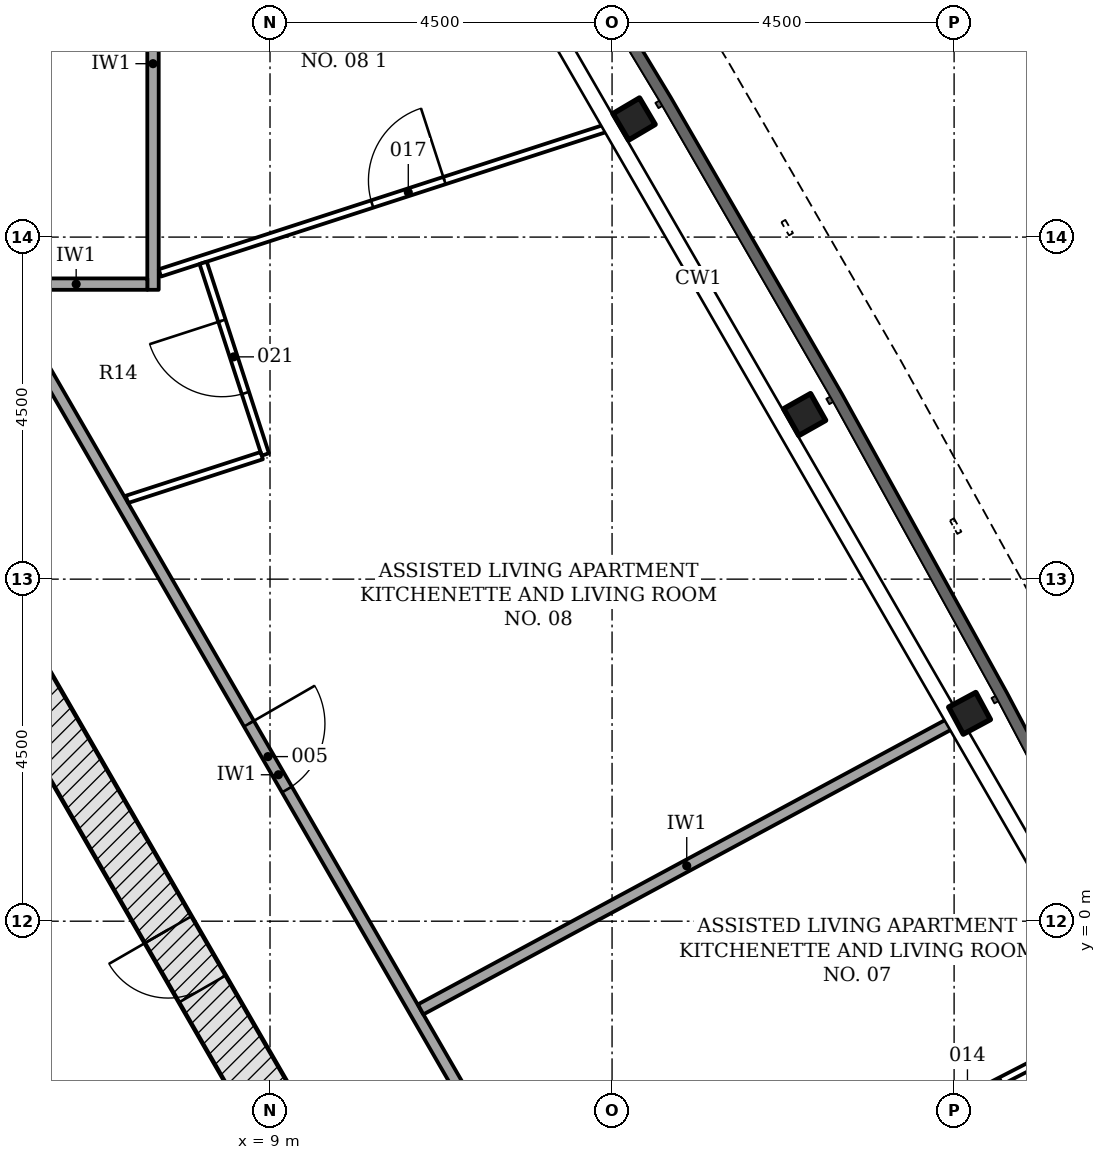
"""IFC4 building model, lengths in metres.
Left out: names, types, materials, properties, quantities, classifications, styles, units other than length and angle.
Written with IfcOpenShell. Run it as: python <this file> out.ifc"""

import sys

from ifc_helpers import new_model, si_unit, direction, frame, frame_2d, origin, origin_2d, place, context, subcontext, project, spatial, rectangle, i_section, extrude, element, fill, save


model = new_model("IFC4")
c1 = context("Model", 3, precision=1e-05, world=origin(), true_north=direction((0.0, 1.0)))
c2 = subcontext(c1, "Body", "Model", "MODEL_VIEW")
j1 = project(units=[si_unit("LENGTHUNIT", "METRE"), si_unit("PLANEANGLEUNIT", "RADIAN")], contexts=[c1])
p1 = place(None, origin())
s1 = spatial("IfcSite", under=j1, at=p1, CompositionType="ELEMENT")
p2 = place(p1, origin())
s2 = spatial("IfcBuilding", under=s1, at=p2, CompositionType="ELEMENT")
p3 = place(p2, frame((0.0, 0.0, 72.6)))
s3 = spatial("IfcBuildingStorey", under=s2, at=p3, CompositionType="ELEMENT", Elevation=72.6)
p4 = place(p3, frame((10.311, -4.703, -0.2), z_axis=(0.0, 0.0, 1.0), x_axis=(-0.500001446645, 0.866024568562, 0.0)))
e1 = element("IfcWall", 1, at=p4, inside=s3, PredefinedType="SHEAR", context=c2, shape_type="SweptSolid", body=[
    extrude(rectangle(XDim=18.458, YDim=0.7, at=frame_2d((9.229, 0.0))), origin(), (0.0, 0.0, 1.0), 3.6),
])
p5 = place(p4, frame((9.5, 0.0, 0.2)))
e2 = element("IfcOpeningElement", 2, at=p5, cuts=e1, PredefinedType="OPENING", context=c2, shape_type="SweptSolid", body=[
    extrude(rectangle(XDim=1.0, YDim=2.1, at=frame_2d((0.5, 1.05))), frame((0.0, 0.36, 0.0), z_axis=(0.0, -1.0, 0.0), x_axis=(1.0, 0.0, 0.0)), (0.0, 0.0, 1.0), 0.72),
])
p6 = place(p4, frame((4.402, 0.0, 0.2)))
e3 = element("IfcOpeningElement", 3, at=p6, cuts=e1, PredefinedType="OPENING", context=c2, shape_type="SweptSolid", body=[
    extrude(rectangle(XDim=0.9, YDim=2.1, at=frame_2d((0.45, 1.05))), frame((0.0, 0.36, 0.0), z_axis=(0.0, -1.0, 0.0), x_axis=(1.0, 0.0, 0.0)), (0.0, 0.0, 1.0), 0.72),
])
p7 = place(p4, frame((13.927, 0.0, 0.2)))
e4 = element("IfcOpeningElement", 4, at=p7, cuts=e1, PredefinedType="OPENING", context=c2, shape_type="SweptSolid", body=[
    extrude(rectangle(XDim=0.9, YDim=2.1, at=frame_2d((0.45, 1.05))), frame((0.0, 0.36, 0.0), z_axis=(0.0, -1.0, 0.0), x_axis=(1.0, 0.0, 0.0)), (0.0, 0.0, 1.0), 0.72),
])
for number, where, z_axis, x_axis in (
    (5, (18.203, 2.735, -0.2), (0.0, 0.0, 1.0), (-0.475, 0.88, 0.0)),
    (6, (16.034, 6.665, -0.2), (0.0, 0.0, 1.0), (-0.492, 0.871, 0.0)),
    (7, (13.789, 10.553, -0.2), (0.0, 0.0, 1.0), (-0.508, 0.861, 0.0)),
):
    element("IfcColumn", number, at=place(p3, frame(where, z_axis=z_axis, x_axis=x_axis)), inside=s3, PredefinedType="COLUMN", context=c2, shape_type="SweptSolid", body=[
        extrude(i_section(OverallWidth=0.404, OverallDepth=0.406, WebThickness=0.027, FlangeThickness=0.044, FilletRadius=0.015, at=origin_2d()), origin(), (0.0, 0.0, 1.0), 3.6),
    ])
p8 = place(p3, frame((5.346, 8.446, 0.0), z_axis=(0.0, 0.0, 1.0), x_axis=(0.500008781656, -0.866020333634, 0.0)))
e8 = element("IfcWall", 8, at=p8, inside=s3, PredefinedType="PARTITIONING", context=c2, shape_type="SweptSolid", body=[
    extrude(rectangle(XDim=15.057, YDim=0.15, at=frame_2d((7.528, 0.0))), origin(), (0.0, 0.0, 1.0), 2.778),
])
p9 = place(p8, frame((12.55, 0.0, 0.0)))
e9 = element("IfcOpeningElement", 9, at=p9, cuts=e8, PredefinedType="OPENING", context=c2, shape_type="SweptSolid", body=[
    extrude(rectangle(XDim=1.0, YDim=2.1, at=frame_2d((0.5, 1.05))), frame((0.0, 0.085, 0.0), z_axis=(0.0, -1.0, 0.0), x_axis=(1.0, 0.0, 0.0)), (0.0, 0.0, 1.0), 0.17),
])
p10 = place(p8, frame((6.753, 0.0, 0.0)))
e10 = element("IfcOpeningElement", 10, at=p10, cuts=e8, PredefinedType="OPENING", context=c2, shape_type="SweptSolid", body=[
    extrude(rectangle(XDim=1.0, YDim=2.1, at=frame_2d((0.5, 1.05))), frame((0.0, 0.085, 0.0), z_axis=(0.0, -1.0, 0.0), x_axis=(1.0, 0.0, 0.0)), (0.0, 0.0, 1.0), 0.17),
])
p11 = place(p3, frame((7.461, 8.306, 0.0), z_axis=(0.0, 0.0, 1.0), x_axis=(0.0, 1.0, 0.0)))
e11 = element("IfcWall", 11, at=p11, inside=s3, PredefinedType="PARTITIONING", context=c2, shape_type="SweptSolid", body=[
    extrude(rectangle(XDim=5.95, YDim=0.15, at=frame_2d((2.975, 0.0))), origin(), (0.0, 0.0, 1.0), 2.778),
])
p12 = place(p3, frame((5.514, 8.381, 0.0), z_axis=(0.0, 0.0, 1.0), x_axis=(1.0, 0.0, 0.0)))
e12 = element("IfcWall", 12, at=p12, inside=s3, PredefinedType="PARTITIONING", context=c2, shape_type="SweptSolid", body=[
    extrude(rectangle(XDim=1.872, YDim=0.15, at=frame_2d((0.936, 0.0))), origin(), (0.0, 0.0, 1.0), 3.4),
])
p13 = place(p3, frame((17.983, 2.616, 0.0), z_axis=(0.0, 0.0, 1.0), x_axis=(-0.880118053528, -0.474754896608, 0.0)))
e13 = element("IfcWall", 13, at=p13, inside=s3, PredefinedType="PARTITIONING", context=c2, shape_type="SweptSolid", body=[
    extrude(rectangle(XDim=7.955, YDim=0.15, at=frame_2d((3.978, 0.0))), origin(), (0.0, 0.0, 1.0), 2.778),
])
p14 = place(p3, frame((20.074, -1.351, 0.0), z_axis=(0.0, 0.0, 1.0), x_axis=(-0.88912315758, -0.457668013582, 0.0)))
e14 = element("IfcWall", 14, at=p14, inside=s3, PredefinedType="PARTITIONING", context=c2, shape_type="SweptSolid", body=[
    extrude(rectangle(XDim=8.429, YDim=0.1, at=frame_2d((4.214, 0.0))), origin(), (0.0, 0.0, 1.0), 2.778),
])
p15 = place(p14, frame((5.868, 0.0, 0.0)))
e15 = element("IfcOpeningElement", 15, at=p15, cuts=e14, PredefinedType="OPENING", context=c2, shape_type="SweptSolid", body=[
    extrude(rectangle(XDim=1.0, YDim=2.1, at=frame_2d((0.5, 1.05))), frame((0.0, 0.06, 0.0), z_axis=(0.0, -1.0, 0.0), x_axis=(1.0, 0.0, 0.0)), (0.0, 0.0, 1.0), 0.12),
])
p16 = place(p14, frame((1.635, 0.0, 0.0)))
e16 = element("IfcOpeningElement", 16, at=p16, cuts=e14, PredefinedType="OPENING", context=c2, shape_type="SweptSolid", body=[
    extrude(rectangle(XDim=1.0, YDim=2.1, at=frame_2d((0.5, 1.05))), frame((0.0, 0.06, 0.0), z_axis=(0.0, -1.0, 0.0), x_axis=(1.0, 0.0, 0.0)), (0.0, 0.0, 1.0), 0.12),
])
p17 = place(p3, frame((7.551, 8.529, 0.0), z_axis=(0.0, 0.0, 1.0), x_axis=(0.951171490306, 0.308662916511, 0.0)))
e17 = element("IfcWall", 17, at=p17, inside=s3, PredefinedType="PARTITIONING", context=c2, shape_type="SweptSolid", body=[
    extrude(rectangle(XDim=6.302, YDim=0.1, at=frame_2d((3.151, 0.0))), origin(), (0.0, 0.0, 1.0), 2.778),
])
p18 = place(p17, frame((2.936, 0.0, 0.0)))
e18 = element("IfcOpeningElement", 18, at=p18, cuts=e17, PredefinedType="OPENING", context=c2, shape_type="SweptSolid", body=[
    extrude(rectangle(XDim=1.0, YDim=2.1, at=frame_2d((0.5, 1.05))), frame((0.0, 0.06, 0.0), z_axis=(0.0, -1.0, 0.0), x_axis=(1.0, 0.0, 0.0)), (0.0, 0.0, 1.0), 0.12),
])
p19 = place(p3, frame((8.938, 6.14, 0.0), z_axis=(0.0, 0.0, 1.0), x_axis=(-0.308644385593, 0.951177503541, 0.0)))
e19 = element("IfcWall", 19, at=p19, inside=s3, PredefinedType="PARTITIONING", context=c2, shape_type="SweptSolid", body=[
    extrude(rectangle(XDim=2.65, YDim=0.1, at=frame_2d((1.325, 0.0))), origin(), (0.0, 0.0, 1.0), 2.778),
])
p20 = place(p19, frame((0.85, 0.0, 0.0)))
e20 = element("IfcOpeningElement", 20, at=p20, cuts=e19, PredefinedType="OPENING", context=c2, shape_type="SweptSolid", body=[
    extrude(rectangle(XDim=1.0, YDim=2.1, at=frame_2d((0.5, 1.05))), frame((0.0, 0.06, 0.0), z_axis=(0.0, -1.0, 0.0), x_axis=(1.0, 0.0, 0.0)), (0.0, 0.0, 1.0), 0.12),
])
p21 = place(p3, frame((7.117, 5.549, 0.0), z_axis=(0.0, 0.0, 1.0), x_axis=(0.951141782181, 0.308754449667, 0.0)))
e21 = element("IfcWall", 21, at=p21, inside=s3, PredefinedType="PARTITIONING", context=c2, shape_type="SweptSolid", body=[
    extrude(rectangle(XDim=1.865, YDim=0.1, at=frame_2d((0.932, 0.0))), origin(), (0.0, 0.0, 1.0), 3.4),
])
p22 = place(p6, origin())
e22 = element("IfcDoor", 22, at=p22, inside=s3, OperationType="SINGLE_SWING_RIGHT", PredefinedType="DOOR", context=c2, shape_type="SweptSolid", body=[
    extrude(rectangle(XDim=0.9, YDim=2.1, at=frame_2d((0.45, 1.05))), frame((0.0, 0.075, 0.0), z_axis=(0.0, -1.0, 0.0), x_axis=(1.0, 0.0, 0.0)), (0.0, 0.0, 1.0), 0.15),
])
fill(e3, e22)
p23 = place(p10, origin())
e23 = element("IfcDoor", 23, at=p23, inside=s3, OperationType="SINGLE_SWING_LEFT", PredefinedType="DOOR", context=c2, shape_type="SweptSolid", body=[
    extrude(rectangle(XDim=1.0, YDim=2.1, at=frame_2d((0.5, 1.05))), frame((0.0, 0.025, 0.0), z_axis=(0.0, -1.0, 0.0), x_axis=(1.0, 0.0, 0.0)), (0.0, 0.0, 1.0), 0.05),
])
fill(e10, e23)
p24 = place(p16, origin())
e24 = element("IfcDoor", 24, at=p24, inside=s3, OperationType="SINGLE_SWING_LEFT", PredefinedType="DOOR", context=c2, shape_type="SweptSolid", body=[
    extrude(rectangle(XDim=1.0, YDim=2.1, at=frame_2d((0.5, 1.05))), frame((0.0, 0.025, 0.0), z_axis=(0.0, -1.0, 0.0), x_axis=(1.0, 0.0, 0.0)), (0.0, 0.0, 1.0), 0.05),
])
fill(e16, e24)
p25 = place(p18, origin())
e25 = element("IfcDoor", 25, at=p25, inside=s3, OperationType="SINGLE_SWING_RIGHT", PredefinedType="DOOR", context=c2, shape_type="SweptSolid", body=[
    extrude(rectangle(XDim=1.0, YDim=2.1, at=frame_2d((0.5, 1.05))), frame((0.0, 0.025, 0.0), z_axis=(0.0, -1.0, 0.0), x_axis=(1.0, 0.0, 0.0)), (0.0, 0.0, 1.0), 0.05),
])
fill(e18, e25)
p26 = place(p20, origin())
e26 = element("IfcDoor", 26, at=p26, inside=s3, OperationType="SINGLE_SWING_RIGHT", PredefinedType="DOOR", context=c2, shape_type="SweptSolid", body=[
    extrude(rectangle(XDim=1.0, YDim=2.1, at=frame_2d((0.5, 1.05))), frame((0.0, 0.025, 0.0), z_axis=(0.0, -1.0, 0.0), x_axis=(1.0, 0.0, 0.0)), (0.0, 0.0, 1.0), 0.05),
])
fill(e20, e26)
save(model, sys.argv[1])
